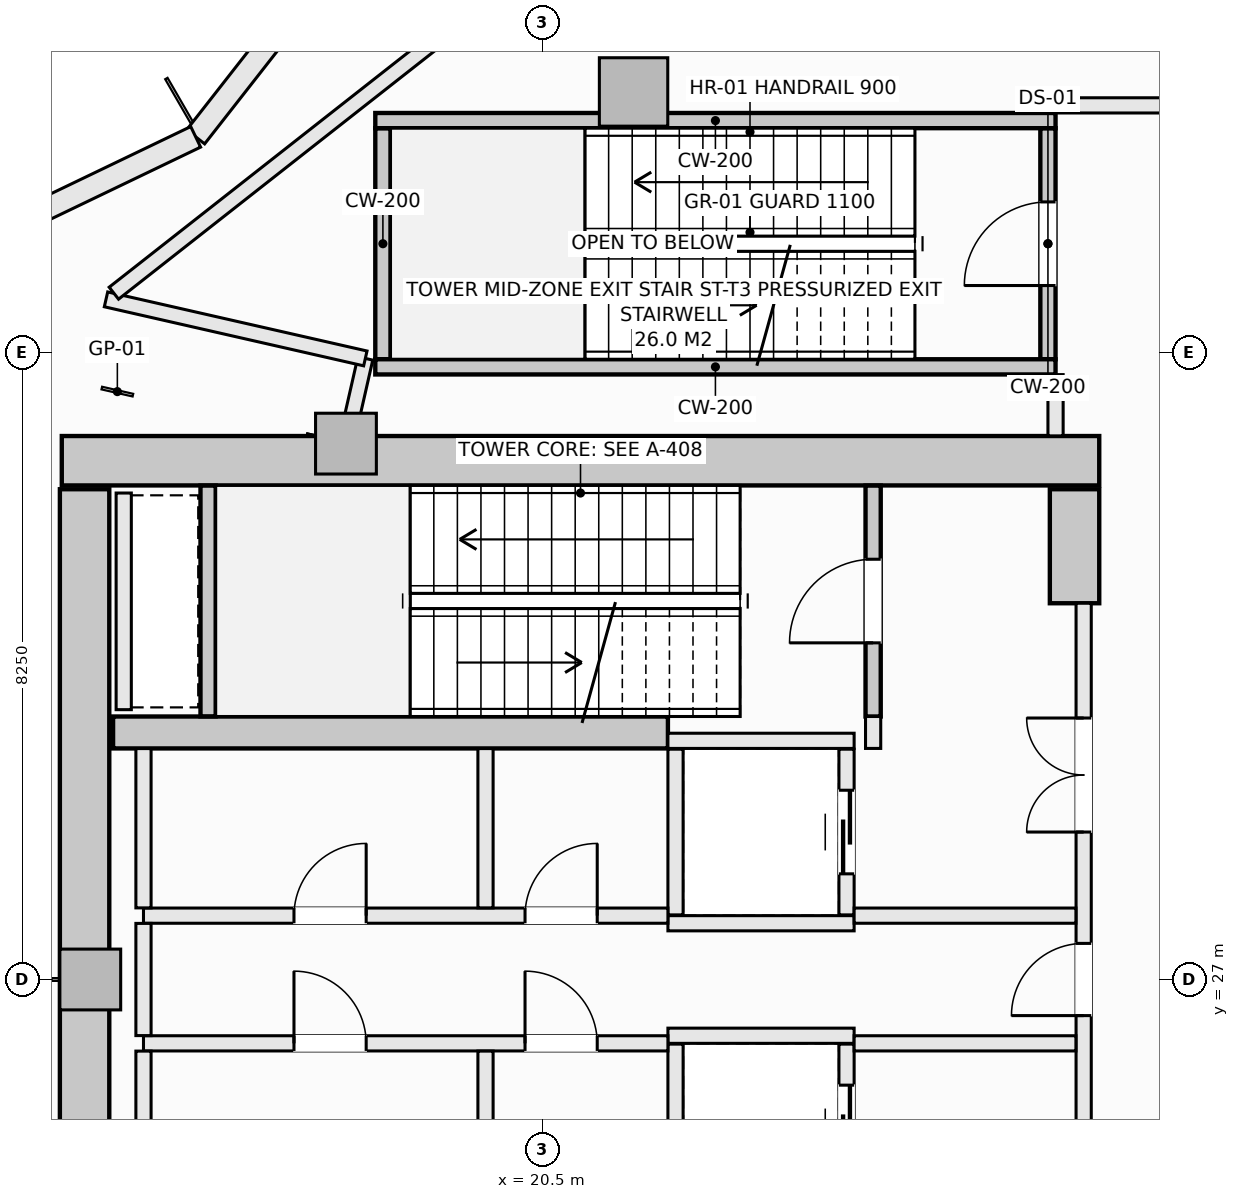
"""IFC4 building model, lengths in metres.
Left out: names, types, materials, properties, quantities, classifications, styles, units other than length and angle.
Written with IfcOpenShell. Run it as: python <this file> out.ifc"""

import sys

from ifc_helpers import new_model, si_unit, direction, frame, frame_2d, origin, origin_2d, place, context, subcontext, project, spatial, rectangle, extrude, element, fill, save


model = new_model("IFC4")
c1 = context("Model", 3, precision=1e-05, world=origin(), true_north=direction((0.0, 1.0)))
c2 = subcontext(c1, "Body", "Model", "MODEL_VIEW")
j1 = project(units=[si_unit("LENGTHUNIT", "METRE"), si_unit("PLANEANGLEUNIT", "RADIAN")], contexts=[c1])
p1 = place(None, origin())
s1 = spatial("IfcSite", under=j1, at=p1, CompositionType="ELEMENT")
p2 = place(p1, origin())
s2 = spatial("IfcBuilding", under=s1, at=p2, CompositionType="ELEMENT")
p3 = place(p2, frame((0.0, 0.0, 186.9)))
s3 = spatial("IfcBuildingStorey", under=s2, at=p3, CompositionType="ELEMENT", Elevation=186.9)
p4 = place(p3, frame((14.175, 33.825, -0.32), z_axis=(0.0, 0.0, 1.0), x_axis=(1.0, 0.0, 0.0)))
e1 = element("IfcWall", 1, at=p4, inside=s3, PredefinedType="SHEAR", context=c2, shape_type="SweptSolid", body=[
    extrude(rectangle(XDim=13.65, YDim=0.65, at=frame_2d((6.825, 0.0))), origin(), (0.0, 0.0, 1.0), 5.04),
])
p5 = place(p3, frame((14.475, 20.55, -0.32), z_axis=(0.0, 0.0, 1.0), x_axis=(0.0, 1.0, 0.0)))
e2 = element("IfcWall", 2, at=p5, inside=s3, PredefinedType="SHEAR", context=c2, shape_type="SweptSolid", body=[
    extrude(rectangle(XDim=12.9, YDim=0.65, at=frame_2d((6.45, 0.0))), origin(), (0.0, 0.0, 1.0), 5.04),
])
p6 = place(p3, frame((27.5, 31.95, -0.32), z_axis=(0.0, 0.0, 1.0), x_axis=(0.0, 1.0, 0.0)))
e3 = element("IfcWall", 3, at=p6, inside=s3, PredefinedType="SHEAR", context=c2, shape_type="SweptSolid", body=[
    extrude(rectangle(XDim=1.5, YDim=0.65, at=frame_2d((0.75, 0.0))), origin(), (0.0, 0.0, 1.0), 5.04),
])
p7 = place(p3, frame((14.85, 30.25, -0.32), z_axis=(0.0, 0.0, 1.0), x_axis=(1.0, 0.0, 0.0)))
e4 = element("IfcWall", 4, at=p7, inside=s3, PredefinedType="SHEAR", context=c2, shape_type="SweptSolid", body=[
    extrude(rectangle(XDim=7.3, YDim=0.42, at=frame_2d((3.65, 0.0))), origin(), (0.0, 0.0, 1.0), 5.04),
])
p8 = place(p3, frame((21.698, 38.677, -0.32), z_axis=(0.0, 0.0, 1.0), x_axis=(1.0, 0.0, 0.0)))
e5 = element("IfcColumn", 5, at=p8, inside=s3, PredefinedType="COLUMN", context=c2, shape_type="SweptSolid", body=[
    extrude(rectangle(XDim=0.9, YDim=0.9, at=origin_2d()), origin(), (0.0, 0.0, 1.0), 5.04),
])
for number, where, z_axis, x_axis in (
    (6, (17.914, 34.05, -0.32), (0.0, 0.0, 1.0), (1.0, 0.0, 0.0)),
    (7, (14.55, 27.0, -0.32), (0.0, 0.0, 1.0), (1.0, 0.0, 0.0)),
):
    element("IfcColumn", number, at=place(p3, frame(where, z_axis=z_axis, x_axis=x_axis)), inside=s3, PredefinedType="PILASTER", context=c2, shape_type="SweptSolid", body=[
        extrude(rectangle(XDim=0.8, YDim=0.8, at=origin_2d()), origin(), (0.0, 0.0, 1.0), 5.04),
    ])
p9 = place(p3, frame((15.937, 38.086, 0.0), z_axis=(0.0, 0.0, 1.0), x_axis=(0.616429245738, 0.787410302828, 0.0)))
e8 = element("IfcWall", 8, at=p9, inside=s3, PredefinedType="SOLIDWALL", context=c2, shape_type="SweptSolid", body=[
    extrude(rectangle(XDim=5.223, YDim=0.3, at=frame_2d((2.612, 0.0))), origin(), (0.0, 0.0, 1.0), 1.15),
])
p10 = place(p3, frame((11.127, 35.775, 0.0), z_axis=(0.0, 0.0, 1.0), x_axis=(0.901353070301, 0.433085029363, 0.0)))
e9 = element("IfcWall", 9, at=p10, inside=s3, PredefinedType="SOLIDWALL", context=c2, shape_type="SweptSolid", body=[
    extrude(rectangle(XDim=5.336, YDim=0.3, at=frame_2d((2.668, 0.0))), origin(), (0.0, 0.0, 1.0), 1.15),
])
p11 = place(p3, frame((24.85, 30.46, -0.32), z_axis=(0.0, 0.0, 1.0), x_axis=(0.0, 1.0, 0.0)))
e10 = element("IfcWall", 10, at=p11, inside=s3, PredefinedType="SHEAR", context=c2, shape_type="SweptSolid", body=[
    extrude(rectangle(XDim=3.038, YDim=0.2, at=frame_2d((1.519, 0.0))), origin(), (0.0, 0.0, 1.0), 5.04),
])
p12 = place(p11, frame((0.969, 0.0, 0.32)))
e11 = element("IfcOpeningElement", 11, at=p12, cuts=e10, PredefinedType="OPENING", context=c2, shape_type="SweptSolid", body=[
    extrude(rectangle(XDim=1.1, YDim=2.15, at=frame_2d((0.55, 1.075))), frame((0.0, 0.11, 0.0), z_axis=(0.0, -1.0, 0.0), x_axis=(1.0, 0.0, 0.0)), (0.0, 0.0, 1.0), 0.22),
])
p13 = place(p3, frame((16.1, 30.462, -0.32), z_axis=(0.0, 0.0, 1.0), x_axis=(0.0, 1.0, 0.0)))
e12 = element("IfcWall", 12, at=p13, inside=s3, PredefinedType="SHEAR", context=c2, shape_type="SweptSolid", body=[
    extrude(rectangle(XDim=3.036, YDim=0.2, at=frame_2d((1.518, 0.0))), origin(), (0.0, 0.0, 1.0), 5.04),
])
p14 = place(p3, frame((27.15, 35.16, -0.32), z_axis=(0.0, 0.0, 1.0), x_axis=(0.0, 1.0, 0.0)))
e13 = element("IfcWall", 13, at=p14, inside=s3, PredefinedType="SHEAR", context=c2, shape_type="SweptSolid", body=[
    extrude(rectangle(XDim=3.04, YDim=0.2, at=frame_2d((1.52, 0.0))), origin(), (0.0, 0.0, 1.0), 5.04),
])
p15 = place(p14, frame((0.97, 0.0, 0.32)))
e14 = element("IfcOpeningElement", 14, at=p15, cuts=e13, PredefinedType="OPENING", context=c2, shape_type="SweptSolid", body=[
    extrude(rectangle(XDim=1.1, YDim=2.15, at=frame_2d((0.55, 1.075))), frame((0.0, 0.11, 0.0), z_axis=(0.0, -1.0, 0.0), x_axis=(1.0, 0.0, 0.0)), (0.0, 0.0, 1.0), 0.22),
])
p16 = place(p3, frame((18.4, 35.16, -0.32), z_axis=(0.0, 0.0, 1.0), x_axis=(0.0, 1.0, 0.0)))
e15 = element("IfcWall", 15, at=p16, inside=s3, PredefinedType="SHEAR", context=c2, shape_type="SweptSolid", body=[
    extrude(rectangle(XDim=3.04, YDim=0.2, at=frame_2d((1.52, 0.0))), origin(), (0.0, 0.0, 1.0), 5.04),
])
for number, where, z_axis, x_axis in (
    (16, (18.3, 38.3, -0.32), (0.0, 0.0, 1.0), (1.0, 0.0, 0.0)),
    (17, (18.3, 35.06, -0.32), (0.0, 0.0, 1.0), (1.0, 0.0, 0.0)),
):
    element("IfcWall", number, at=place(p3, frame(where, z_axis=z_axis, x_axis=x_axis)), inside=s3, PredefinedType="SHEAR", context=c2, shape_type="SweptSolid", body=[
        extrude(rectangle(XDim=8.95, YDim=0.2, at=frame_2d((4.475, 0.0))), origin(), (0.0, 0.0, 1.0), 5.04),
    ])
for number, where, z_axis, x_axis in (
    (18, (22.15, 30.14, 0.0), (0.0, 0.0, 1.0), (1.0, 0.0, 0.0)),
    (19, (22.15, 27.74, 0.0), (0.0, 0.0, 1.0), (1.0, 0.0, 0.0)),
):
    element("IfcWall", number, at=place(p3, frame(where, z_axis=z_axis, x_axis=x_axis)), inside=s3, PredefinedType="SOLIDWALL", context=c2, shape_type="SweptSolid", body=[
        extrude(rectangle(XDim=2.45, YDim=0.2, at=frame_2d((1.225, 0.0))), origin(), (0.0, 0.0, 1.0), 4.72),
    ])
p17 = place(p3, frame((22.25, 27.85, 0.0), z_axis=(0.0, 0.0, 1.0), x_axis=(0.0, 1.0, 0.0)))
e20 = element("IfcWall", 20, at=p17, inside=s3, PredefinedType="SOLIDWALL", context=c2, shape_type="SweptSolid", body=[
    extrude(rectangle(XDim=2.18, YDim=0.2, at=frame_2d((1.09, 0.0))), origin(), (0.0, 0.0, 1.0), 4.72),
])
p18 = place(p3, frame((24.5, 27.85, 0.0), z_axis=(0.0, 0.0, 1.0), x_axis=(0.0, 1.0, 0.0)))
e21 = element("IfcWall", 21, at=p18, inside=s3, PredefinedType="SOLIDWALL", context=c2, shape_type="SweptSolid", body=[
    extrude(rectangle(XDim=2.18, YDim=0.2, at=frame_2d((1.09, 0.0))), origin(), (0.0, 0.0, 1.0), 4.72),
])
p19 = place(p18, frame((0.54, 0.0, 0.0)))
e22 = element("IfcOpeningElement", 22, at=p19, cuts=e21, PredefinedType="OPENING", context=c2, shape_type="SweptSolid", body=[
    extrude(rectangle(XDim=1.1, YDim=2.2, at=frame_2d((0.55, 1.1))), frame((0.0, 0.11, 0.0), z_axis=(0.0, -1.0, 0.0), x_axis=(1.0, 0.0, 0.0)), (0.0, 0.0, 1.0), 0.22),
])
p20 = place(p3, frame((22.15, 26.26, 0.0), z_axis=(0.0, 0.0, 1.0), x_axis=(1.0, 0.0, 0.0)))
e23 = element("IfcWall", 23, at=p20, inside=s3, PredefinedType="SOLIDWALL", context=c2, shape_type="SweptSolid", body=[
    extrude(rectangle(XDim=2.45, YDim=0.2, at=frame_2d((1.225, 0.0))), origin(), (0.0, 0.0, 1.0), 4.72),
])
p21 = place(p3, frame((22.25, 23.97, 0.0), z_axis=(0.0, 0.0, 1.0), x_axis=(0.0, 1.0, 0.0)))
e24 = element("IfcWall", 24, at=p21, inside=s3, PredefinedType="SOLIDWALL", context=c2, shape_type="SweptSolid", body=[
    extrude(rectangle(XDim=2.18, YDim=0.2, at=frame_2d((1.09, 0.0))), origin(), (0.0, 0.0, 1.0), 4.72),
])
p22 = place(p3, frame((24.5, 23.97, 0.0), z_axis=(0.0, 0.0, 1.0), x_axis=(0.0, 1.0, 0.0)))
e25 = element("IfcWall", 25, at=p22, inside=s3, PredefinedType="SOLIDWALL", context=c2, shape_type="SweptSolid", body=[
    extrude(rectangle(XDim=2.18, YDim=0.2, at=frame_2d((1.09, 0.0))), origin(), (0.0, 0.0, 1.0), 4.72),
])
p23 = place(p22, frame((0.54, 0.0, 0.0)))
e26 = element("IfcOpeningElement", 26, at=p23, cuts=e25, PredefinedType="OPENING", context=c2, shape_type="SweptSolid", body=[
    extrude(rectangle(XDim=1.1, YDim=2.2, at=frame_2d((0.55, 1.1))), frame((0.0, 0.11, 0.0), z_axis=(0.0, -1.0, 0.0), x_axis=(1.0, 0.0, 0.0)), (0.0, 0.0, 1.0), 0.22),
])
p24 = place(p3, frame((14.99, 30.55, 0.0), z_axis=(0.0, 0.0, 1.0), x_axis=(0.0, 1.0, 0.0)))
e27 = element("IfcWall", 27, at=p24, inside=s3, PredefinedType="SOLIDWALL", context=c2, shape_type="SweptSolid", body=[
    extrude(rectangle(XDim=2.85, YDim=0.2, at=frame_2d((1.425, 0.0))), origin(), (0.0, 0.0, 1.0), 4.72),
])
p25 = place(p3, frame((24.85, 30.04, 0.0), z_axis=(0.0, 0.0, 1.0), x_axis=(0.0, 1.0, 0.0)))
e28 = element("IfcWall", 28, at=p25, inside=s3, PredefinedType="SOLIDWALL", context=c2, shape_type="SweptSolid", body=[
    extrude(rectangle(XDim=0.42, YDim=0.2, at=frame_2d((0.21, 0.0))), origin(), (0.0, 0.0, 1.0), 4.72),
])
p26 = place(p3, frame((27.62, 22.05, 0.0), z_axis=(0.0, 0.0, 1.0), x_axis=(0.0, 1.0, 0.0)))
e29 = element("IfcWall", 29, at=p26, inside=s3, PredefinedType="SOLIDWALL", context=c2, shape_type="SweptSolid", body=[
    extrude(rectangle(XDim=9.9, YDim=0.2, at=frame_2d((4.95, 0.0))), origin(), (0.0, 0.0, 1.0), 3.812),
])
p27 = place(p26, frame((4.475, 0.0, 0.0)))
e30 = element("IfcOpeningElement", 30, at=p27, cuts=e29, PredefinedType="OPENING", context=c2, shape_type="SweptSolid", body=[
    extrude(rectangle(XDim=0.95, YDim=2.1, at=frame_2d((0.475, 1.05))), frame((0.0, 0.11, 0.0), z_axis=(0.0, -1.0, 0.0), x_axis=(1.0, 0.0, 0.0)), (0.0, 0.0, 1.0), 0.22),
])
p28 = place(p26, frame((6.89, 0.0, 0.0)))
e31 = element("IfcOpeningElement", 31, at=p28, cuts=e29, PredefinedType="OPENING", context=c2, shape_type="SweptSolid", body=[
    extrude(rectangle(XDim=1.5, YDim=2.2, at=frame_2d((0.75, 1.1))), frame((0.0, 0.11, 0.0), z_axis=(0.0, -1.0, 0.0), x_axis=(1.0, 0.0, 0.0)), (0.0, 0.0, 1.0), 0.22),
])
p29 = place(p26, frame((1.51, 0.0, 0.0)))
e32 = element("IfcOpeningElement", 32, at=p29, cuts=e29, PredefinedType="OPENING", context=c2, shape_type="SweptSolid", body=[
    extrude(rectangle(XDim=1.5, YDim=2.2, at=frame_2d((0.75, 1.1))), frame((0.0, 0.11, 0.0), z_axis=(0.0, -1.0, 0.0), x_axis=(1.0, 0.0, 0.0)), (0.0, 0.0, 1.0), 0.22),
])
p30 = place(p3, frame((15.25, 27.84, 0.0), z_axis=(0.0, 0.0, 1.0), x_axis=(1.0, 0.0, 0.0)))
e33 = element("IfcWall", 33, at=p30, inside=s3, PredefinedType="SOLIDWALL", context=c2, shape_type="SweptSolid", body=[
    extrude(rectangle(XDim=6.9, YDim=0.2, at=frame_2d((3.45, 0.0))), origin(), (0.0, 0.0, 1.0), 4.72),
])
p31 = place(p30, frame((5.02, 0.0, 0.0)))
e34 = element("IfcOpeningElement", 34, at=p31, cuts=e33, PredefinedType="OPENING", context=c2, shape_type="SweptSolid", body=[
    extrude(rectangle(XDim=0.95, YDim=2.1, at=frame_2d((0.475, 1.05))), frame((0.0, 0.11, 0.0), z_axis=(0.0, -1.0, 0.0), x_axis=(1.0, 0.0, 0.0)), (0.0, 0.0, 1.0), 0.22),
])
p32 = place(p30, frame((1.98, 0.0, 0.0)))
e35 = element("IfcOpeningElement", 35, at=p32, cuts=e33, PredefinedType="OPENING", context=c2, shape_type="SweptSolid", body=[
    extrude(rectangle(XDim=0.95, YDim=2.1, at=frame_2d((0.475, 1.05))), frame((0.0, 0.11, 0.0), z_axis=(0.0, -1.0, 0.0), x_axis=(1.0, 0.0, 0.0)), (0.0, 0.0, 1.0), 0.22),
])
p33 = place(p3, frame((24.6, 27.84, 0.0), z_axis=(0.0, 0.0, 1.0), x_axis=(1.0, 0.0, 0.0)))
e36 = element("IfcWall", 36, at=p33, inside=s3, PredefinedType="SOLIDWALL", context=c2, shape_type="SweptSolid", body=[
    extrude(rectangle(XDim=2.918, YDim=0.2, at=frame_2d((1.459, 0.0))), origin(), (0.0, 0.0, 1.0), 4.72),
])
p34 = place(p3, frame((15.25, 26.16, 0.0), z_axis=(0.0, 0.0, 1.0), x_axis=(1.0, 0.0, 0.0)))
e37 = element("IfcWall", 37, at=p34, inside=s3, PredefinedType="SOLIDWALL", context=c2, shape_type="SweptSolid", body=[
    extrude(rectangle(XDim=6.9, YDim=0.2, at=frame_2d((3.45, 0.0))), origin(), (0.0, 0.0, 1.0), 4.72),
])
p35 = place(p34, frame((5.02, 0.0, 0.0)))
e38 = element("IfcOpeningElement", 38, at=p35, cuts=e37, PredefinedType="OPENING", context=c2, shape_type="SweptSolid", body=[
    extrude(rectangle(XDim=0.95, YDim=2.1, at=frame_2d((0.475, 1.05))), frame((0.0, 0.11, 0.0), z_axis=(0.0, -1.0, 0.0), x_axis=(1.0, 0.0, 0.0)), (0.0, 0.0, 1.0), 0.22),
])
p36 = place(p34, frame((1.98, 0.0, 0.0)))
e39 = element("IfcOpeningElement", 39, at=p36, cuts=e37, PredefinedType="OPENING", context=c2, shape_type="SweptSolid", body=[
    extrude(rectangle(XDim=0.95, YDim=2.1, at=frame_2d((0.475, 1.05))), frame((0.0, 0.11, 0.0), z_axis=(0.0, -1.0, 0.0), x_axis=(1.0, 0.0, 0.0)), (0.0, 0.0, 1.0), 0.22),
])
p37 = place(p3, frame((24.6, 26.16, 0.0), z_axis=(0.0, 0.0, 1.0), x_axis=(1.0, 0.0, 0.0)))
e40 = element("IfcWall", 40, at=p37, inside=s3, PredefinedType="SOLIDWALL", context=c2, shape_type="SweptSolid", body=[
    extrude(rectangle(XDim=2.918, YDim=0.2, at=frame_2d((1.459, 0.0))), origin(), (0.0, 0.0, 1.0), 4.72),
])
p38 = place(p3, frame((15.25, 23.962, 0.0), z_axis=(0.0, 0.0, 1.0), x_axis=(0.0, 1.0, 0.0)))
e41 = element("IfcWall", 41, at=p38, inside=s3, PredefinedType="SOLIDWALL", context=c2, shape_type="SweptSolid", body=[
    extrude(rectangle(XDim=2.096, YDim=0.2, at=frame_2d((1.048, 0.0))), origin(), (0.0, 0.0, 1.0), 4.72),
])
p39 = place(p3, frame((15.25, 26.262, 0.0), z_axis=(0.0, 0.0, 1.0), x_axis=(0.0, 1.0, 0.0)))
e42 = element("IfcWall", 42, at=p39, inside=s3, PredefinedType="SOLIDWALL", context=c2, shape_type="SweptSolid", body=[
    extrude(rectangle(XDim=1.476, YDim=0.2, at=frame_2d((0.738, 0.0))), origin(), (0.0, 0.0, 1.0), 4.72),
])
for number, where, z_axis, x_axis in (
    (43, (15.25, 27.942, 0.0), (0.0, 0.0, 1.0), (0.0, 1.0, 0.0)),
    (44, (19.75, 23.962, 0.0), (0.0, 0.0, 1.0), (0.0, 1.0, 0.0)),
    (45, (19.75, 27.942, 0.0), (0.0, 0.0, 1.0), (0.0, 1.0, 0.0)),
):
    element("IfcWall", number, at=place(p3, frame(where, z_axis=z_axis, x_axis=x_axis)), inside=s3, PredefinedType="SOLIDWALL", context=c2, shape_type="SweptSolid", body=[
        extrude(rectangle(XDim=2.096, YDim=0.2, at=frame_2d((1.048, 0.0))), origin(), (0.0, 0.0, 1.0), 4.72),
    ])
p40 = place(p3, frame((27.25, 34.152, 0.0), z_axis=(0.0, 0.0, 1.0), x_axis=(0.0, 1.0, 0.0)))
e46 = element("IfcWall", 46, at=p40, inside=s3, PredefinedType="SOLIDWALL", context=c2, shape_type="SweptSolid", body=[
    extrude(rectangle(XDim=0.806, YDim=0.2, at=frame_2d((0.403, 0.0))), origin(), (0.0, 0.0, 1.0), 4.72),
])
p41 = place(p3, frame((27.25, 38.5, 0.0), z_axis=(0.0, 0.0, 1.0), x_axis=(1.0, 0.0, 0.0)))
e47 = element("IfcWall", 47, at=p41, inside=s3, PredefinedType="SOLIDWALL", context=c2, shape_type="SweptSolid", body=[
    extrude(rectangle(XDim=2.53, YDim=0.2, at=frame_2d((1.265, 0.0))), origin(), (0.0, 0.0, 1.0), 4.72),
])
p42 = place(p3, frame((17.937, 34.152, 0.0), z_axis=(0.0, 0.0, 1.0), x_axis=(0.221974559012, 0.975052457641, 0.0)))
e48 = element("IfcWall", 48, at=p42, inside=s3, PredefinedType="SOLIDWALL", context=c2, shape_type="SweptSolid", body=[
    extrude(rectangle(XDim=1.045, YDim=0.2, at=frame_2d((0.522, 0.0))), origin(), (0.0, 0.0, 1.0), 4.72),
])
p43 = place(p3, frame((14.757, 35.948, 0.0), z_axis=(0.0, 0.0, 1.0), x_axis=(0.975029260281, -0.222076431877, 0.0)))
e49 = element("IfcWall", 49, at=p43, inside=s3, PredefinedType="SOLIDWALL", context=c2, shape_type="SweptSolid", body=[
    extrude(rectangle(XDim=3.499, YDim=0.2, at=frame_2d((1.75, 0.0))), origin(), (0.0, 0.0, 1.0), 4.72),
])
p44 = place(p3, frame((14.86, 36.029, 0.0), z_axis=(0.0, 0.0, 1.0), x_axis=(0.786475634876, 0.617621304479, 0.0)))
e50 = element("IfcWall", 50, at=p44, inside=s3, PredefinedType="SOLIDWALL", context=c2, shape_type="SweptSolid", body=[
    extrude(rectangle(XDim=6.839, YDim=0.2, at=frame_2d((3.419, 0.0))), origin(), (0.0, 0.0, 1.0), 4.72),
])
p45 = place(p12, origin())
e51 = element("IfcDoor", 51, at=p45, inside=s3, OperationType="SINGLE_SWING_LEFT", PredefinedType="DOOR", context=c2, shape_type="SweptSolid", body=[
    extrude(rectangle(XDim=1.1, YDim=2.15, at=frame_2d((0.55, 1.075))), frame((0.0, 0.025, 0.0), z_axis=(0.0, -1.0, 0.0), x_axis=(1.0, 0.0, 0.0)), (0.0, 0.0, 1.0), 0.05),
])
fill(e11, e51)
p46 = place(p15, origin())
e52 = element("IfcDoor", 52, at=p46, inside=s3, OperationType="SINGLE_SWING_LEFT", PredefinedType="DOOR", context=c2, shape_type="SweptSolid", body=[
    extrude(rectangle(XDim=1.1, YDim=2.15, at=frame_2d((0.55, 1.075))), frame((0.0, 0.025, 0.0), z_axis=(0.0, -1.0, 0.0), x_axis=(1.0, 0.0, 0.0)), (0.0, 0.0, 1.0), 0.05),
])
fill(e14, e52)
p47 = place(p19, origin())
e53 = element("IfcDoor", 53, at=p47, inside=s3, OperationType="SLIDING_TO_LEFT", PredefinedType="DOOR", context=c2, shape_type="SweptSolid", body=[
    extrude(rectangle(XDim=1.1, YDim=2.2, at=frame_2d((0.55, 1.1))), frame((0.0, 0.025, 0.0), z_axis=(0.0, -1.0, 0.0), x_axis=(1.0, 0.0, 0.0)), (0.0, 0.0, 1.0), 0.05),
])
fill(e22, e53)
p48 = place(p23, origin())
e54 = element("IfcDoor", 54, at=p48, inside=s3, OperationType="SLIDING_TO_LEFT", PredefinedType="DOOR", context=c2, shape_type="SweptSolid", body=[
    extrude(rectangle(XDim=1.1, YDim=2.2, at=frame_2d((0.55, 1.1))), frame((0.0, 0.025, 0.0), z_axis=(0.0, -1.0, 0.0), x_axis=(1.0, 0.0, 0.0)), (0.0, 0.0, 1.0), 0.05),
])
fill(e26, e54)
p49 = place(p27, origin())
e55 = element("IfcDoor", 55, at=p49, inside=s3, OperationType="SINGLE_SWING_LEFT", PredefinedType="DOOR", context=c2, shape_type="SweptSolid", body=[
    extrude(rectangle(XDim=0.95, YDim=2.1, at=frame_2d((0.475, 1.05))), frame((0.0, 0.025, 0.0), z_axis=(0.0, -1.0, 0.0), x_axis=(1.0, 0.0, 0.0)), (0.0, 0.0, 1.0), 0.05),
])
fill(e30, e55)
p50 = place(p28, origin())
e56 = element("IfcDoor", 56, at=p50, inside=s3, OperationType="DOUBLE_DOOR_SINGLE_SWING", PredefinedType="DOOR", context=c2, shape_type="SweptSolid", body=[
    extrude(rectangle(XDim=1.5, YDim=2.2, at=frame_2d((0.75, 1.1))), frame((0.0, 0.025, 0.0), z_axis=(0.0, -1.0, 0.0), x_axis=(1.0, 0.0, 0.0)), (0.0, 0.0, 1.0), 0.05),
])
fill(e31, e56)
p51 = place(p31, origin())
e57 = element("IfcDoor", 57, at=p51, inside=s3, OperationType="SINGLE_SWING_RIGHT", PredefinedType="DOOR", context=c2, shape_type="SweptSolid", body=[
    extrude(rectangle(XDim=0.95, YDim=2.1, at=frame_2d((0.475, 1.05))), frame((0.0, 0.025, 0.0), z_axis=(0.0, -1.0, 0.0), x_axis=(1.0, 0.0, 0.0)), (0.0, 0.0, 1.0), 0.05),
])
fill(e34, e57)
p52 = place(p35, origin())
e58 = element("IfcDoor", 58, at=p52, inside=s3, OperationType="SINGLE_SWING_LEFT", PredefinedType="DOOR", context=c2, shape_type="SweptSolid", body=[
    extrude(rectangle(XDim=0.95, YDim=2.1, at=frame_2d((0.475, 1.05))), frame((0.0, 0.025, 0.0), z_axis=(0.0, -1.0, 0.0), x_axis=(1.0, 0.0, 0.0)), (0.0, 0.0, 1.0), 0.05),
])
fill(e38, e58)
p53 = place(p32, origin())
e59 = element("IfcDoor", 59, at=p53, inside=s3, OperationType="SINGLE_SWING_RIGHT", PredefinedType="DOOR", context=c2, shape_type="SweptSolid", body=[
    extrude(rectangle(XDim=0.95, YDim=2.1, at=frame_2d((0.475, 1.05))), frame((0.0, 0.025, 0.0), z_axis=(0.0, -1.0, 0.0), x_axis=(1.0, 0.0, 0.0)), (0.0, 0.0, 1.0), 0.05),
])
fill(e35, e59)
p54 = place(p36, origin())
e60 = element("IfcDoor", 60, at=p54, inside=s3, OperationType="SINGLE_SWING_LEFT", PredefinedType="DOOR", context=c2, shape_type="SweptSolid", body=[
    extrude(rectangle(XDim=0.95, YDim=2.1, at=frame_2d((0.475, 1.05))), frame((0.0, 0.025, 0.0), z_axis=(0.0, -1.0, 0.0), x_axis=(1.0, 0.0, 0.0)), (0.0, 0.0, 1.0), 0.05),
])
fill(e39, e60)
save(model, sys.argv[1])
